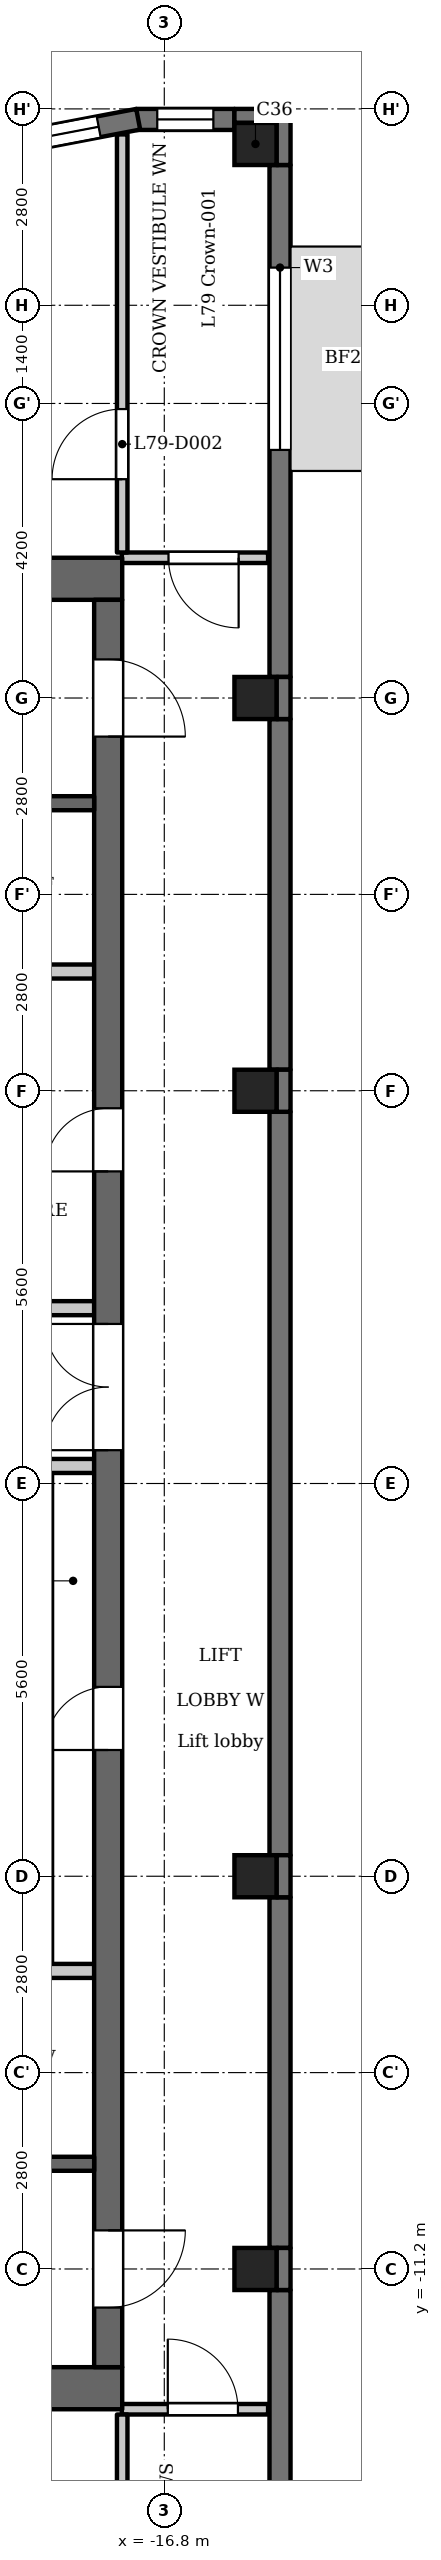
"""IFC4 building model, lengths in metres.
Left out: names, types, materials, properties, quantities, classifications, styles, units other than length and angle.
Written with IfcOpenShell. Run it as: python <this file> out.ifc"""

import sys

from ifc_helpers import new_model, si_unit, direction, frame, frame_2d, origin, origin_2d, place, context, subcontext, project, spatial, polyline, rectangle, outline, extrude, element, fill, save


model = new_model("IFC4")
c1 = context("Model", 3, precision=1e-05, world=origin(), true_north=direction((0.0, 1.0)))
c2 = subcontext(c1, "Body", "Model", "MODEL_VIEW")
j1 = project(units=[si_unit("LENGTHUNIT", "METRE"), si_unit("PLANEANGLEUNIT", "RADIAN")], contexts=[c1])
p1 = place(None, origin())
s1 = spatial("IfcSite", under=j1, at=p1, CompositionType="ELEMENT")
p2 = place(p1, origin())
s2 = spatial("IfcBuilding", under=s1, at=p2, CompositionType="ELEMENT")
p3 = place(p2, frame((0.0, 0.0, 306.9)))
s3 = spatial("IfcBuildingStorey", under=s2, at=p3, CompositionType="ELEMENT", Elevation=306.9)
for number, where, z_axis, x_axis in (
    (1, (-15.5, -11.2, 0.0), (0.0, 0.0, 1.0), (1.0, 0.0, 0.0)),
    (2, (-15.5, -5.6, 0.0), (0.0, 0.0, 1.0), (1.0, 0.0, 0.0)),
    (3, (-15.5, 5.6, 0.0), (0.0, 0.0, 1.0), (1.0, 0.0, 0.0)),
    (4, (-15.5, 11.2, 0.0), (0.0, 0.0, 1.0), (1.0, 0.0, 0.0)),
    (5, (-15.5, 19.1, 0.0), (0.0, 0.0, 1.0), (1.0, 0.0, 0.0)),
):
    element("IfcColumn", number, at=place(p3, frame(where, z_axis=z_axis, x_axis=x_axis)), inside=s3, PredefinedType="COLUMN", context=c2, shape_type="SweptSolid", body=[
        extrude(rectangle(XDim=0.6, YDim=0.6, at=origin_2d()), origin(), (0.0, 0.0, 1.0), 3.5),
    ])
p4 = place(p3, frame((-15.15, -18.8, 0.0), z_axis=(0.0, 0.0, 1.0), x_axis=(0.0, 1.0, 0.0)))
e6 = element("IfcWall", 6, at=p4, inside=s3, PredefinedType="SOLIDWALL", context=c2, shape_type="SweptSolid", body=[
    extrude(rectangle(XDim=7.3, YDim=0.3, at=frame_2d((3.65, 0.0))), origin(), (0.0, 0.0, 1.0), 3.2),
])
p5 = place(p4, frame((1.863, 0.0, 0.9)))
e7 = element("IfcOpeningElement", 7, at=p5, cuts=e6, PredefinedType="OPENING", context=c2, shape_type="SweptSolid", body=[
    extrude(rectangle(XDim=1.8, YDim=1.25, at=frame_2d((0.9, 0.625))), frame((0.0, 0.16, 0.0), z_axis=(0.0, -1.0, 0.0), x_axis=(1.0, 0.0, 0.0)), (0.0, 0.0, 1.0), 0.32),
])
p6 = place(p3, frame((-15.15, -10.9, 0.0), z_axis=(0.0, 0.0, 1.0), x_axis=(0.0, 1.0, 0.0)))
e8 = element("IfcWall", 8, at=p6, inside=s3, PredefinedType="SOLIDWALL", context=c2, shape_type="SweptSolid", body=[
    extrude(rectangle(XDim=5.0, YDim=0.3, at=frame_2d((2.5, 0.0))), origin(), (0.0, 0.0, 1.0), 3.2),
])
p7 = place(p3, frame((-15.15, -5.3, 0.0), z_axis=(0.0, 0.0, 1.0), x_axis=(0.0, 1.0, 0.0)))
e9 = element("IfcWall", 9, at=p7, inside=s3, PredefinedType="SOLIDWALL", context=c2, shape_type="SweptSolid", body=[
    extrude(rectangle(XDim=10.6, YDim=0.3, at=frame_2d((5.3, 0.0))), origin(), (0.0, 0.0, 1.0), 3.2),
])
p8 = place(p3, frame((-15.15, 5.9, 0.0), z_axis=(0.0, 0.0, 1.0), x_axis=(0.0, 1.0, 0.0)))
e10 = element("IfcWall", 10, at=p8, inside=s3, PredefinedType="SOLIDWALL", context=c2, shape_type="SweptSolid", body=[
    extrude(rectangle(XDim=5.0, YDim=0.3, at=frame_2d((2.5, 0.0))), origin(), (0.0, 0.0, 1.0), 3.2),
])
p9 = place(p3, frame((-15.15, 11.5, 0.0), z_axis=(0.0, 0.0, 1.0), x_axis=(0.0, 1.0, 0.0)))
e11 = element("IfcWall", 11, at=p9, inside=s3, PredefinedType="SOLIDWALL", context=c2, shape_type="SweptSolid", body=[
    extrude(rectangle(XDim=7.3, YDim=0.3, at=frame_2d((3.65, 0.0))), origin(), (0.0, 0.0, 1.0), 3.2),
])
p10 = place(p9, frame((3.238, 0.0, 0.9)))
e12 = element("IfcOpeningElement", 12, at=p10, cuts=e11, PredefinedType="OPENING", context=c2, shape_type="SweptSolid", body=[
    extrude(rectangle(XDim=2.6, YDim=1.25, at=frame_2d((1.3, 0.625))), frame((0.0, 0.16, 0.0), z_axis=(0.0, -1.0, 0.0), x_axis=(1.0, 0.0, 0.0)), (0.0, 0.0, 1.0), 0.32),
])
p11 = place(p3, frame((-15.8, 19.45, 0.0), z_axis=(0.0, 0.0, 1.0), x_axis=(-1.0, 0.0, 0.0)))
e13 = element("IfcWall", 13, at=p11, inside=s3, PredefinedType="SOLIDWALL", context=c2, shape_type="SweptSolid", body=[
    extrude(rectangle(XDim=1.4, YDim=0.3, at=frame_2d((0.7, 0.0))), origin(), (0.0, 0.0, 1.0), 3.2),
])
p12 = place(p11, frame((0.3, 0.0, 0.6)))
e14 = element("IfcOpeningElement", 14, at=p12, cuts=e13, PredefinedType="OPENING", context=c2, shape_type="SweptSolid", body=[
    extrude(rectangle(XDim=0.8, YDim=1.55, at=frame_2d((0.4, 0.775))), frame((0.0, 0.16, 0.0), z_axis=(0.0, -1.0, 0.0), x_axis=(1.0, 0.0, 0.0)), (0.0, 0.0, 1.0), 0.32),
])
p13 = place(p3, frame((-17.172, 19.453, 0.0), z_axis=(0.0, 0.0, 1.0), x_axis=(-0.982286967073, -0.187382801553, 0.0)))
e15 = element("IfcWall", 15, at=p13, inside=s3, PredefinedType="SOLIDWALL", context=c2, shape_type="SweptSolid", body=[
    extrude(rectangle(XDim=1.948, YDim=0.3, at=frame_2d((0.974, 0.0))), origin(), (0.0, 0.0, 1.0), 2.6),
])
p14 = place(p13, frame((0.574, 0.0, 0.6)))
e16 = element("IfcOpeningElement", 16, at=p14, cuts=e15, PredefinedType="OPENING", context=c2, shape_type="SweptSolid", body=[
    extrude(rectangle(XDim=0.8, YDim=1.55, at=frame_2d((0.4, 0.775))), frame((0.0, 0.16, 0.0), z_axis=(0.0, -1.0, 0.0), x_axis=(1.0, 0.0, 0.0)), (0.0, 0.0, 1.0), 0.32),
])
for number, where, z_axis, x_axis in (
    (17, (-17.4, 12.9, 0.0), (0.0, 0.0, 1.0), (-1.0, 0.0, 0.0)),
    (18, (-17.4, -12.9, 0.0), (0.0, 0.0, 1.0), (-1.0, 0.0, 0.0)),
):
    element("IfcWall", number, at=place(p3, frame(where, z_axis=z_axis, x_axis=x_axis)), inside=s3, PredefinedType="SHEAR", context=c2, shape_type="SweptSolid", body=[
        extrude(rectangle(XDim=7.6, YDim=0.6, at=frame_2d((3.8, 0.0))), origin(), (0.0, 0.0, 1.0), 3.2),
    ])
p15 = place(p3, frame((-17.6, -12.6, 0.0), z_axis=(0.0, 0.0, 1.0), x_axis=(0.0, 1.0, 0.0)))
e19 = element("IfcWall", 19, at=p15, inside=s3, PredefinedType="SHEAR", context=c2, shape_type="SweptSolid", body=[
    extrude(rectangle(XDim=25.2, YDim=0.4, at=frame_2d((12.6, 0.0))), origin(), (0.0, 0.0, 1.0), 3.2),
])
p16 = place(p15, frame((8.8, 0.0, 0.0)))
e20 = element("IfcOpeningElement", 20, at=p16, cuts=e19, PredefinedType="OPENING", context=c2, shape_type="SweptSolid", body=[
    extrude(rectangle(XDim=0.9, YDim=2.1, at=frame_2d((0.45, 1.05))), frame((0.0, 0.21, 0.0), z_axis=(0.0, -1.0, 0.0), x_axis=(1.0, 0.0, 0.0)), (0.0, 0.0, 1.0), 0.42),
])
p17 = place(p15, frame((17.05, 0.0, 0.0)))
e21 = element("IfcOpeningElement", 21, at=p17, cuts=e19, PredefinedType="OPENING", context=c2, shape_type="SweptSolid", body=[
    extrude(rectangle(XDim=0.9, YDim=2.1, at=frame_2d((0.45, 1.05))), frame((0.0, 0.21, 0.0), z_axis=(0.0, -1.0, 0.0), x_axis=(1.0, 0.0, 0.0)), (0.0, 0.0, 1.0), 0.42),
])
p18 = place(p15, frame((23.25, 0.0, 0.0)))
e22 = element("IfcOpeningElement", 22, at=p18, cuts=e19, PredefinedType="OPENING", context=c2, shape_type="SweptSolid", body=[
    extrude(rectangle(XDim=1.1, YDim=2.1, at=frame_2d((0.55, 1.05))), frame((0.0, 0.21, 0.0), z_axis=(0.0, -1.0, 0.0), x_axis=(1.0, 0.0, 0.0)), (0.0, 0.0, 1.0), 0.42),
])
p19 = place(p15, frame((0.85, 0.0, 0.0)))
e23 = element("IfcOpeningElement", 23, at=p19, cuts=e19, PredefinedType="OPENING", context=c2, shape_type="SweptSolid", body=[
    extrude(rectangle(XDim=1.1, YDim=2.1, at=frame_2d((0.55, 1.05))), frame((0.0, 0.21, 0.0), z_axis=(0.0, -1.0, 0.0), x_axis=(1.0, 0.0, 0.0)), (0.0, 0.0, 1.0), 0.42),
])
p20 = place(p15, frame((13.075, 0.0, 0.0)))
e24 = element("IfcOpeningElement", 24, at=p20, cuts=e19, PredefinedType="OPENING", context=c2, shape_type="SweptSolid", body=[
    extrude(rectangle(XDim=1.8, YDim=2.1, at=frame_2d((0.9, 1.05))), frame((0.0, 0.21, 0.0), z_axis=(0.0, -1.0, 0.0), x_axis=(1.0, 0.0, 0.0)), (0.0, 0.0, 1.0), 0.42),
])
p21 = place(p3, frame((-17.8, -9.7, 0.0), z_axis=(0.0, 0.0, 1.0), x_axis=(-1.0, 0.0, 0.0)))
e25 = element("IfcWall", 25, at=p21, inside=s3, PredefinedType="SHEAR", context=c2, shape_type="SweptSolid", body=[
    extrude(rectangle(XDim=5.8, YDim=0.2, at=frame_2d((2.9, 0.0))), origin(), (0.0, 0.0, 1.0), 3.2),
])
p22 = place(p21, frame((0.85, 0.0, 0.0)))
e26 = element("IfcOpeningElement", 26, at=p22, cuts=e25, PredefinedType="OPENING", context=c2, shape_type="SweptSolid", body=[
    extrude(rectangle(XDim=1.1, YDim=2.1, at=frame_2d((0.55, 1.05))), frame((0.0, 0.11, 0.0), z_axis=(0.0, -1.0, 0.0), x_axis=(1.0, 0.0, 0.0)), (0.0, 0.0, 1.0), 0.22),
])
p23 = place(p21, frame((3.75, 0.0, 0.0)))
e27 = element("IfcOpeningElement", 27, at=p23, cuts=e25, PredefinedType="OPENING", context=c2, shape_type="SweptSolid", body=[
    extrude(rectangle(XDim=1.1, YDim=2.1, at=frame_2d((0.55, 1.05))), frame((0.0, 0.11, 0.0), z_axis=(0.0, -1.0, 0.0), x_axis=(1.0, 0.0, 0.0)), (0.0, 0.0, 1.0), 0.22),
])
p24 = place(p3, frame((-17.8, -6.95, 0.0), z_axis=(0.0, 0.0, 1.0), x_axis=(-1.0, 0.0, 0.0)))
e28 = element("IfcWall", 28, at=p24, inside=s3, PredefinedType="PARTITIONING", context=c2, shape_type="SweptSolid", body=[
    extrude(rectangle(XDim=2.8, YDim=0.2, at=frame_2d((1.4, 0.0))), origin(), (0.0, 0.0, 1.0), 3.2),
])
p25 = place(p3, frame((-17.8, 0.25, 0.0), z_axis=(0.0, 0.0, 1.0), x_axis=(-1.0, 0.0, 0.0)))
e29 = element("IfcWall", 29, at=p25, inside=s3, PredefinedType="PARTITIONING", context=c2, shape_type="SweptSolid", body=[
    extrude(rectangle(XDim=3.0, YDim=0.2, at=frame_2d((1.5, 0.0))), origin(), (0.0, 0.0, 1.0), 3.2),
])
p26 = place(p25, frame((1.35, 0.0, 0.0)))
e30 = element("IfcOpeningElement", 30, at=p26, cuts=e29, PredefinedType="OPENING", context=c2, shape_type="SweptSolid", body=[
    extrude(rectangle(XDim=0.9, YDim=2.1, at=frame_2d((0.45, 1.05))), frame((0.0, 0.11, 0.0), z_axis=(0.0, -1.0, 0.0), x_axis=(1.0, 0.0, 0.0)), (0.0, 0.0, 1.0), 0.22),
])
p27 = place(p3, frame((-17.8, 2.5, 0.0), z_axis=(0.0, 0.0, 1.0), x_axis=(-1.0, 0.0, 0.0)))
e31 = element("IfcWall", 31, at=p27, inside=s3, PredefinedType="PARTITIONING", context=c2, shape_type="SweptSolid", body=[
    extrude(rectangle(XDim=3.0, YDim=0.2, at=frame_2d((1.5, 0.0))), origin(), (0.0, 0.0, 1.0), 3.2),
])
p28 = place(p3, frame((-17.8, 7.3, 0.0), z_axis=(0.0, 0.0, 1.0), x_axis=(-1.0, 0.0, 0.0)))
e32 = element("IfcWall", 32, at=p28, inside=s3, PredefinedType="PARTITIONING", context=c2, shape_type="SweptSolid", body=[
    extrude(rectangle(XDim=2.8, YDim=0.2, at=frame_2d((1.4, 0.0))), origin(), (0.0, 0.0, 1.0), 3.2),
])
p29 = place(p3, frame((-17.8, 9.7, 0.0), z_axis=(0.0, 0.0, 1.0), x_axis=(-1.0, 0.0, 0.0)))
e33 = element("IfcWall", 33, at=p29, inside=s3, PredefinedType="SHEAR", context=c2, shape_type="SweptSolid", body=[
    extrude(rectangle(XDim=5.8, YDim=0.2, at=frame_2d((2.9, 0.0))), origin(), (0.0, 0.0, 1.0), 3.2),
])
p30 = place(p29, frame((0.85, 0.0, 0.0)))
e34 = element("IfcOpeningElement", 34, at=p30, cuts=e33, PredefinedType="OPENING", context=c2, shape_type="SweptSolid", body=[
    extrude(rectangle(XDim=1.1, YDim=2.1, at=frame_2d((0.55, 1.05))), frame((0.0, 0.11, 0.0), z_axis=(0.0, -1.0, 0.0), x_axis=(1.0, 0.0, 0.0)), (0.0, 0.0, 1.0), 0.22),
])
p31 = place(p29, frame((3.75, 0.0, 0.0)))
e35 = element("IfcOpeningElement", 35, at=p31, cuts=e33, PredefinedType="OPENING", context=c2, shape_type="SweptSolid", body=[
    extrude(rectangle(XDim=1.1, YDim=2.1, at=frame_2d((0.55, 1.05))), frame((0.0, 0.11, 0.0), z_axis=(0.0, -1.0, 0.0), x_axis=(1.0, 0.0, 0.0)), (0.0, 0.0, 1.0), 0.22),
])
p32 = place(p3, frame((-17.405, -13.2, 0.0), z_axis=(0.0, 0.0, 1.0), x_axis=(1.0, 0.0, 0.0)))
e36 = element("IfcWall", 36, at=p32, inside=s3, PredefinedType="PARTITIONING", context=c2, shape_type="SweptSolid", body=[
    extrude(rectangle(XDim=2.085, YDim=0.15, at=frame_2d((1.042, 0.0))), origin(), (0.0, 0.0, 1.0), 3.2),
])
p33 = place(p32, frame((0.655, 0.0, 0.0)))
e37 = element("IfcOpeningElement", 37, at=p33, cuts=e36, PredefinedType="OPENING", context=c2, shape_type="SweptSolid", body=[
    extrude(rectangle(XDim=1.0, YDim=2.1, at=frame_2d((0.5, 1.05))), frame((0.0, 0.085, 0.0), z_axis=(0.0, -1.0, 0.0), x_axis=(1.0, 0.0, 0.0)), (0.0, 0.0, 1.0), 0.17),
])
p34 = place(p3, frame((-17.405, 13.2, 0.0), z_axis=(0.0, 0.0, 1.0), x_axis=(1.0, 0.0, 0.0)))
e38 = element("IfcWall", 38, at=p34, inside=s3, PredefinedType="PARTITIONING", context=c2, shape_type="SweptSolid", body=[
    extrude(rectangle(XDim=2.085, YDim=0.15, at=frame_2d((1.042, 0.0))), origin(), (0.0, 0.0, 1.0), 3.2),
])
p35 = place(p34, frame((0.665, 0.0, 0.0)))
e39 = element("IfcOpeningElement", 39, at=p35, cuts=e38, PredefinedType="OPENING", context=c2, shape_type="SweptSolid", body=[
    extrude(rectangle(XDim=1.0, YDim=2.1, at=frame_2d((0.5, 1.05))), frame((0.0, 0.085, 0.0), z_axis=(0.0, -1.0, 0.0), x_axis=(1.0, 0.0, 0.0)), (0.0, 0.0, 1.0), 0.17),
])
p36 = place(p3, frame((-17.4, -19.236, 0.0), z_axis=(0.0, 0.0, 1.0), x_axis=(0.0, 1.0, 0.0)))
e40 = element("IfcWall", 40, at=p36, inside=s3, PredefinedType="PARTITIONING", context=c2, shape_type="SweptSolid", body=[
    extrude(rectangle(XDim=5.961, YDim=0.15, at=frame_2d((2.981, 0.0))), origin(), (0.0, 0.0, 1.0), 3.2),
])
p37 = place(p36, frame((0.386, 0.0, 0.0)))
e41 = element("IfcOpeningElement", 41, at=p37, cuts=e40, PredefinedType="OPENING", context=c2, shape_type="SweptSolid", body=[
    extrude(rectangle(XDim=1.0, YDim=2.1, at=frame_2d((0.5, 1.05))), frame((0.0, 0.085, 0.0), z_axis=(0.0, -1.0, 0.0), x_axis=(1.0, 0.0, 0.0)), (0.0, 0.0, 1.0), 0.17),
])
p38 = place(p3, frame((-17.4, 13.275, 0.0), z_axis=(0.0, 0.0, 1.0), x_axis=(0.0, 1.0, 0.0)))
e42 = element("IfcWall", 42, at=p38, inside=s3, PredefinedType="PARTITIONING", context=c2, shape_type="SweptSolid", body=[
    extrude(rectangle(XDim=5.961, YDim=0.15, at=frame_2d((2.981, 0.0))), origin(), (0.0, 0.0, 1.0), 3.2),
])
p39 = place(p38, frame((1.045, 0.0, 0.0)))
e43 = element("IfcOpeningElement", 43, at=p39, cuts=e42, PredefinedType="OPENING", context=c2, shape_type="SweptSolid", body=[
    extrude(rectangle(XDim=1.0, YDim=2.1, at=frame_2d((0.5, 1.05))), frame((0.0, 0.085, 0.0), z_axis=(0.0, -1.0, 0.0), x_axis=(1.0, 0.0, 0.0)), (0.0, 0.0, 1.0), 0.17),
])
p40 = place(p3, origin())
e44 = element("IfcWall", 44, at=p40, inside=s3, PredefinedType="SOLIDWALL", context=c2, shape_type="SweptSolid", body=[
    extrude(outline(polyline([(-15.0, 18.8), (-15.0, 19.6), (-15.8, 19.6), (-15.8, 19.4), (-15.2, 19.4), (-15.2, 18.8), (-15.0, 18.8)])), origin(), (0.0, 0.0, 1.0), 3.2),
])
e45 = element("IfcWall", 45, at=p40, inside=s3, PredefinedType="SOLIDWALL", context=c2, shape_type="SweptSolid", body=[
    extrude(outline(polyline([(-15.2, 10.9), (-15.0, 10.9), (-15.0, 11.5), (-15.2, 11.5), (-15.2, 10.9)])), origin(), (0.0, 0.0, 1.0), 3.2),
])
e46 = element("IfcWall", 46, at=p40, inside=s3, PredefinedType="SOLIDWALL", context=c2, shape_type="SweptSolid", body=[
    extrude(outline(polyline([(-15.2, 5.3), (-15.0, 5.3), (-15.0, 5.9), (-15.3, 5.9), (-15.2, 5.9), (-15.2, 5.3)])), origin(), (0.0, 0.0, 1.0), 3.2),
])
e47 = element("IfcWall", 47, at=p40, inside=s3, PredefinedType="SOLIDWALL", context=c2, shape_type="SweptSolid", body=[
    extrude(outline(polyline([(-15.3, -5.9), (-15.0, -5.9), (-15.0, -5.3), (-15.3, -5.3), (-15.2, -5.3), (-15.2, -5.9), (-15.3, -5.9)])), origin(), (0.0, 0.0, 1.0), 3.2),
])
e48 = element("IfcWall", 48, at=p40, inside=s3, PredefinedType="SOLIDWALL", context=c2, shape_type="SweptSolid", body=[
    extrude(outline(polyline([(-15.2, -11.5), (-15.0, -11.5), (-15.0, -10.9), (-15.2, -10.9), (-15.2, -11.5)])), origin(), (0.0, 0.0, 1.0), 3.2),
])
p41 = place(p16, origin())
e49 = element("IfcDoor", 49, at=p41, inside=s3, OperationType="SINGLE_SWING_RIGHT", PredefinedType="DOOR", context=c2, shape_type="SweptSolid", body=[
    extrude(rectangle(XDim=0.9, YDim=2.1, at=frame_2d((0.45, 1.05))), frame((0.0, 0.025, 0.0), z_axis=(0.0, -1.0, 0.0), x_axis=(1.0, 0.0, 0.0)), (0.0, 0.0, 1.0), 0.05),
])
fill(e20, e49)
p42 = place(p17, origin())
e50 = element("IfcDoor", 50, at=p42, inside=s3, OperationType="SINGLE_SWING_RIGHT", PredefinedType="DOOR", context=c2, shape_type="SweptSolid", body=[
    extrude(rectangle(XDim=0.9, YDim=2.1, at=frame_2d((0.45, 1.05))), frame((0.0, 0.025, 0.0), z_axis=(0.0, -1.0, 0.0), x_axis=(1.0, 0.0, 0.0)), (0.0, 0.0, 1.0), 0.05),
])
fill(e21, e50)
p43 = place(p18, origin())
e51 = element("IfcDoor", 51, at=p43, inside=s3, OperationType="SINGLE_SWING_LEFT", PredefinedType="DOOR", context=c2, shape_type="SweptSolid", body=[
    extrude(rectangle(XDim=1.1, YDim=2.1, at=frame_2d((0.55, 1.05))), frame((0.0, 0.025, 0.0), z_axis=(0.0, -1.0, 0.0), x_axis=(1.0, 0.0, 0.0)), (0.0, 0.0, 1.0), 0.05),
])
fill(e22, e51)
p44 = place(p19, origin())
e52 = element("IfcDoor", 52, at=p44, inside=s3, OperationType="SINGLE_SWING_RIGHT", PredefinedType="DOOR", context=c2, shape_type="SweptSolid", body=[
    extrude(rectangle(XDim=1.1, YDim=2.1, at=frame_2d((0.55, 1.05))), frame((0.0, 0.025, 0.0), z_axis=(0.0, -1.0, 0.0), x_axis=(1.0, 0.0, 0.0)), (0.0, 0.0, 1.0), 0.05),
])
fill(e23, e52)
p45 = place(p20, origin())
e53 = element("IfcDoor", 53, at=p45, inside=s3, OperationType="DOUBLE_DOOR_SINGLE_SWING", PredefinedType="DOOR", context=c2, shape_type="SweptSolid", body=[
    extrude(rectangle(XDim=1.8, YDim=2.1, at=frame_2d((0.9, 1.05))), frame((0.0, 0.025, 0.0), z_axis=(0.0, -1.0, 0.0), x_axis=(1.0, 0.0, 0.0)), (0.0, 0.0, 1.0), 0.05),
])
fill(e24, e53)
p46 = place(p35, origin())
e54 = element("IfcDoor", 54, at=p46, inside=s3, OperationType="SINGLE_SWING_RIGHT", PredefinedType="DOOR", context=c2, shape_type="SweptSolid", body=[
    extrude(rectangle(XDim=1.0, YDim=2.1, at=frame_2d((0.5, 1.05))), frame((0.0, 0.025, 0.0), z_axis=(0.0, -1.0, 0.0), x_axis=(1.0, 0.0, 0.0)), (0.0, 0.0, 1.0), 0.05),
])
fill(e39, e54)
p47 = place(p39, origin())
e55 = element("IfcDoor", 55, at=p47, inside=s3, OperationType="SINGLE_SWING_RIGHT", PredefinedType="DOOR", context=c2, shape_type="SweptSolid", body=[
    extrude(rectangle(XDim=1.0, YDim=2.1, at=frame_2d((0.5, 1.05))), frame((0.0, 0.025, 0.0), z_axis=(0.0, -1.0, 0.0), x_axis=(1.0, 0.0, 0.0)), (0.0, 0.0, 1.0), 0.05),
])
fill(e43, e55)
p48 = place(p33, origin())
e56 = element("IfcDoor", 56, at=p48, inside=s3, OperationType="SINGLE_SWING_RIGHT", PredefinedType="DOOR", context=c2, shape_type="SweptSolid", body=[
    extrude(rectangle(XDim=1.0, YDim=2.1, at=frame_2d((0.5, 1.05))), frame((0.0, 0.025, 0.0), z_axis=(0.0, -1.0, 0.0), x_axis=(1.0, 0.0, 0.0)), (0.0, 0.0, 1.0), 0.05),
])
fill(e37, e56)
p49 = place(p10, origin())
e57 = element("IfcWindow", 57, at=p49, inside=s3, PartitioningType="SINGLE_PANEL", PredefinedType="WINDOW", context=c2, shape_type="SweptSolid", body=[
    extrude(rectangle(XDim=2.6, YDim=1.25, at=frame_2d((1.3, 0.625))), frame((0.0, 0.03, 0.0), z_axis=(0.0, -1.0, 0.0), x_axis=(1.0, 0.0, 0.0)), (0.0, 0.0, 1.0), 0.06),
])
fill(e12, e57)
p50 = place(p12, origin())
e58 = element("IfcWindow", 58, at=p50, inside=s3, PartitioningType="SINGLE_PANEL", PredefinedType="WINDOW", context=c2, shape_type="SweptSolid", body=[
    extrude(rectangle(XDim=0.8, YDim=1.55, at=frame_2d((0.4, 0.775))), frame((0.0, 0.03, 0.0), z_axis=(0.0, -1.0, 0.0), x_axis=(1.0, 0.0, 0.0)), (0.0, 0.0, 1.0), 0.06),
])
fill(e14, e58)
p51 = place(p14, origin())
e59 = element("IfcWindow", 59, at=p51, inside=s3, PartitioningType="SINGLE_PANEL", PredefinedType="WINDOW", context=c2, shape_type="SweptSolid", body=[
    extrude(rectangle(XDim=0.8, YDim=1.55, at=frame_2d((0.4, 0.775))), frame((0.0, 0.03, 0.0), z_axis=(0.0, -1.0, 0.0), x_axis=(1.0, 0.0, 0.0)), (0.0, 0.0, 1.0), 0.06),
])
fill(e16, e59)
save(model, sys.argv[1])
